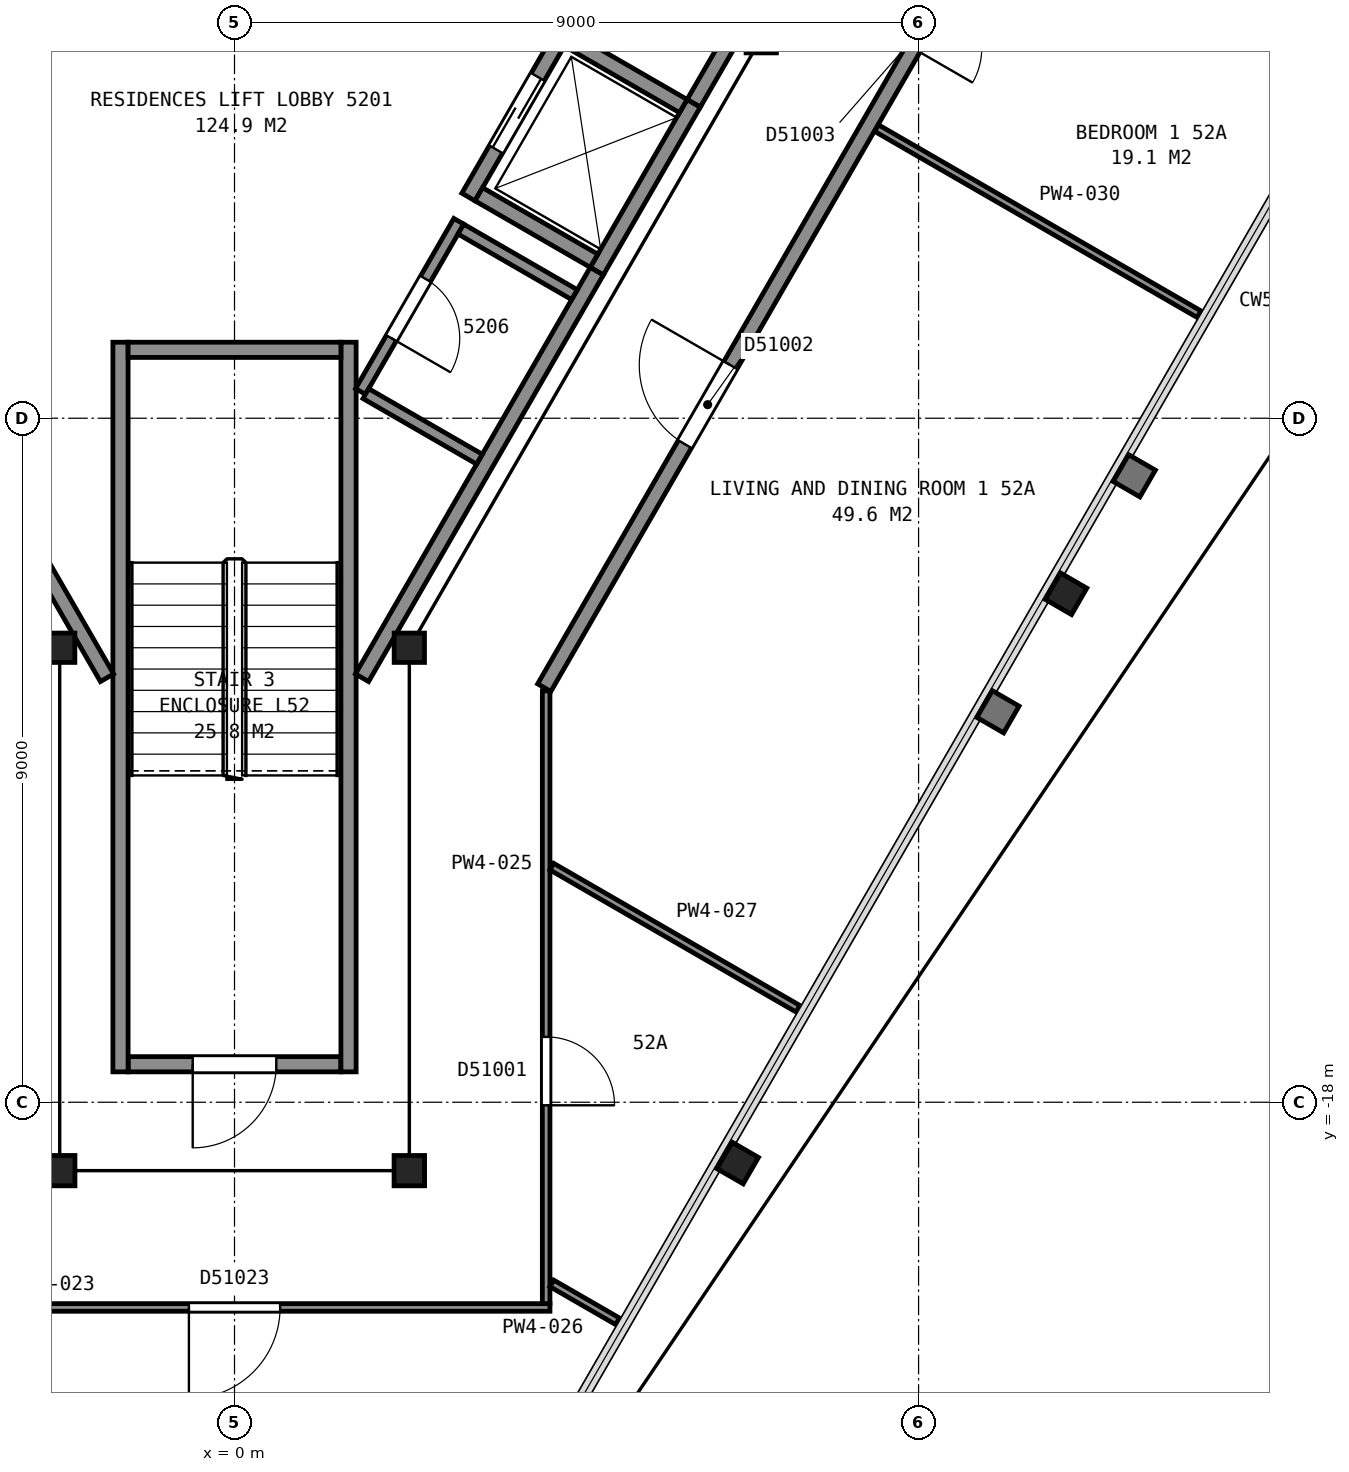
"""IFC4 building model, lengths in metres.
Left out: names, types, materials, properties, quantities, classifications, styles, units other than length and angle.
Written with IfcOpenShell. Run it as: python <this file> out.ifc"""

import sys

from ifc_helpers import new_model, si_unit, direction, frame, frame_2d, origin, origin_2d, place, context, subcontext, project, spatial, rectangle, i_section, extrude, element, fill, save


model = new_model("IFC4")
c1 = context("Model", 3, precision=1e-05, world=origin(), true_north=direction((0.0, 1.0)))
c2 = subcontext(c1, "Body", "Model", "MODEL_VIEW")
j1 = project(units=[si_unit("LENGTHUNIT", "METRE"), si_unit("PLANEANGLEUNIT", "RADIAN")], contexts=[c1])
p1 = place(None, origin())
s1 = spatial("IfcSite", under=j1, at=p1, CompositionType="ELEMENT")
p2 = place(p1, origin())
s2 = spatial("IfcBuilding", under=s1, at=p2, CompositionType="ELEMENT")
p3 = place(p2, frame((0.0, 0.0, 210.1)))
s3 = spatial("IfcBuildingStorey", under=s2, at=p3, CompositionType="ELEMENT", Elevation=210.1)
for number, where, z_axis, x_axis in (
    (1, (6.62, -18.8, 0.0), (0.0, 0.0, 1.0), (-0.5, -0.866, 0.0)),
    (2, (10.94, -11.31, 0.0), (0.0, 0.0, 1.0), (-0.5, -0.866, 0.0)),
):
    element("IfcColumn", number, at=place(p3, frame(where, z_axis=z_axis, x_axis=x_axis)), inside=s3, PredefinedType="COLUMN", context=c2, shape_type="SweptSolid", body=[
        extrude(i_section(OverallWidth=0.401, OverallDepth=0.399, WebThickness=0.025, FlangeThickness=0.04, FilletRadius=0.015, at=origin_2d()), origin(), (0.0, 0.0, 1.0), 3.665),
    ])
p4 = place(p3, frame((-2.3, -12.02, 0.0), z_axis=(0.0, 0.0, 1.0), x_axis=(1.0, 0.0, 0.0)))
e3 = element("IfcColumn", 3, at=p4, inside=s3, PredefinedType="COLUMN", context=c2, shape_type="SweptSolid", body=[
    extrude(i_section(OverallWidth=0.399, OverallDepth=0.386, WebThickness=0.021, FlangeThickness=0.033, FilletRadius=0.015, at=origin_2d()), origin(), (0.0, 0.0, 1.0), 3.7),
])
for number, where, z_axis, x_axis in (
    (4, (-2.3, -18.9, 0.0), (0.0, 0.0, 1.0), (-1.0, 0.0, 0.0)),
    (5, (2.3, -18.9, 0.0), (0.0, 0.0, 1.0), (-1.0, 0.0, 0.0)),
):
    element("IfcColumn", number, at=place(p3, frame(where, z_axis=z_axis, x_axis=x_axis)), inside=s3, PredefinedType="COLUMN", context=c2, shape_type="SweptSolid", body=[
        extrude(i_section(OverallWidth=0.401, OverallDepth=0.399, WebThickness=0.025, FlangeThickness=0.04, FilletRadius=0.015, at=origin_2d()), origin(), (0.0, 0.0, 1.0), 3.7),
    ])
for number, where, z_axis, x_axis in (
    (6, (2.3, -12.02, 0.0), (0.0, 0.0, 1.0), (1.0, 0.0, 0.0)),
    (7, (6.93, -4.0, 0.0), (0.0, 0.0, 1.0), (1.0, 0.0, 0.0)),
):
    element("IfcColumn", number, at=place(p3, frame(where, z_axis=z_axis, x_axis=x_axis)), inside=s3, PredefinedType="COLUMN", context=c2, shape_type="SweptSolid", body=[
        extrude(i_section(OverallWidth=0.399, OverallDepth=0.386, WebThickness=0.021, FlangeThickness=0.033, FilletRadius=0.015, at=origin_2d()), origin(), (0.0, 0.0, 1.0), 3.7),
    ])
p5 = place(p3, frame((-1.4, -17.5, 0.0), z_axis=(0.0, 0.0, 1.0), x_axis=(1.0, 0.0, 0.0)))
e8 = element("IfcWall", 8, at=p5, inside=s3, PredefinedType="PARTITIONING", context=c2, shape_type="SweptSolid", body=[
    extrude(rectangle(XDim=2.8, YDim=0.2, at=frame_2d((1.4, 0.0))), origin(), (0.0, 0.0, 1.0), 3.45),
])
p6 = place(p5, frame((0.85, 0.0, 0.0)))
e9 = element("IfcOpeningElement", 9, at=p6, cuts=e8, PredefinedType="OPENING", context=c2, shape_type="SweptSolid", body=[
    extrude(rectangle(XDim=1.1, YDim=2.1, at=frame_2d((0.55, 1.05))), frame((0.0, 0.11, 0.0), z_axis=(0.0, -1.0, 0.0), x_axis=(1.0, 0.0, 0.0)), (0.0, 0.0, 1.0), 0.22),
])
for number, where, z_axis, x_axis in (
    (10, (1.5, -8.0, 0.0), (0.0, 0.0, 1.0), (0.0, -1.0, 0.0)),
    (11, (-1.5, -8.0, 0.0), (0.0, 0.0, 1.0), (0.0, -1.0, 0.0)),
):
    element("IfcWall", number, at=place(p3, frame(where, z_axis=z_axis, x_axis=x_axis)), inside=s3, PredefinedType="PARTITIONING", context=c2, shape_type="SweptSolid", body=[
        extrude(rectangle(XDim=9.6, YDim=0.2, at=frame_2d((4.8, 0.0))), origin(), (0.0, 0.0, 1.0), 3.45),
    ])
p7 = place(p3, frame((-1.4, -8.1, 0.0), z_axis=(0.0, 0.0, 1.0), x_axis=(1.0, 0.0, 0.0)))
e12 = element("IfcWall", 12, at=p7, inside=s3, PredefinedType="PARTITIONING", context=c2, shape_type="SweptSolid", body=[
    extrude(rectangle(XDim=2.8, YDim=0.2, at=frame_2d((1.4, 0.0))), origin(), (0.0, 0.0, 1.0), 3.45),
])
p8 = place(p3, frame((4.766, -7.065, 0.0), z_axis=(0.0, 0.0, 1.0), x_axis=(0.499948979701, 0.866054858364, 0.0)))
e13 = element("IfcWall", 13, at=p8, inside=s3, PredefinedType="PARTITIONING", context=c2, shape_type="SweptSolid", body=[
    extrude(rectangle(XDim=2.55, YDim=0.2, at=frame_2d((1.275, 0.0))), origin(), (0.0, 0.0, 1.0), 3.7),
])
p9 = place(p3, frame((3.077, -6.09, 0.0), z_axis=(0.0, 0.0, 1.0), x_axis=(0.500062241894, 0.865989465428, 0.0)))
e14 = element("IfcWall", 14, at=p9, inside=s3, PredefinedType="PARTITIONING", context=c2, shape_type="SweptSolid", body=[
    extrude(rectangle(XDim=2.55, YDim=0.2, at=frame_2d((1.275, 0.0))), origin(), (0.0, 0.0, 1.0), 3.7),
])
p10 = place(p9, frame((0.725, 0.0, 0.0)))
e15 = element("IfcOpeningElement", 15, at=p10, cuts=e14, PredefinedType="OPENING", context=c2, shape_type="SweptSolid", body=[
    extrude(rectangle(XDim=1.1, YDim=2.1, at=frame_2d((0.55, 1.05))), frame((0.0, 0.11, 0.0), z_axis=(0.0, -1.0, 0.0), x_axis=(1.0, 0.0, 0.0)), (0.0, 0.0, 1.0), 0.22),
])
p11 = place(p3, frame((5.905, -4.893, 0.0), z_axis=(0.0, 0.0, 1.0), x_axis=(-0.866002029911, 0.500040482552, 0.0)))
e16 = element("IfcWall", 16, at=p11, inside=s3, PredefinedType="PARTITIONING", context=c2, shape_type="SweptSolid", body=[
    extrude(rectangle(XDim=1.75, YDim=0.2, at=frame_2d((0.875, 0.0))), origin(), (0.0, 0.0, 1.0), 3.7),
])
p12 = place(p3, frame((4.73, -6.928, 0.0), z_axis=(0.0, 0.0, 1.0), x_axis=(-0.866036909293, 0.499980071345, 0.0)))
e17 = element("IfcWall", 17, at=p12, inside=s3, PredefinedType="PARTITIONING", context=c2, shape_type="SweptSolid", body=[
    extrude(rectangle(XDim=1.75, YDim=0.2, at=frame_2d((0.875, 0.0))), origin(), (0.0, 0.0, 1.0), 3.7),
])
p13 = place(p3, frame((-4.655, -7.257, 0.0), z_axis=(0.0, 0.0, 1.0), x_axis=(0.499966124405, -0.866044960985, 0.0)))
e18 = element("IfcWall", 18, at=p13, inside=s3, PredefinedType="PARTITIONING", context=c2, shape_type="SweptSolid", body=[
    extrude(rectangle(XDim=5.956, YDim=0.2, at=frame_2d((2.978, 0.0))), origin(), (0.0, 0.0, 1.0), 3.45),
])
p14 = place(p13, frame((0.45, 0.0, 0.0)))
e19 = element("IfcOpeningElement", 19, at=p14, cuts=e18, PredefinedType="OPENING", context=c2, shape_type="SweptSolid", body=[
    extrude(rectangle(XDim=1.8, YDim=2.1, at=frame_2d((0.9, 1.05))), frame((0.0, 0.11, 0.0), z_axis=(0.0, -1.0, 0.0), x_axis=(1.0, 0.0, 0.0)), (0.0, 0.0, 1.0), 0.22),
])
p15 = place(p3, frame((1.677, -12.415, 0.0), z_axis=(0.0, 0.0, 1.0), x_axis=(0.500054337157, 0.865994029939, 0.0)))
e20 = element("IfcWall", 20, at=p15, inside=s3, PredefinedType="PARTITIONING", context=c2, shape_type="SweptSolid", body=[
    extrude(rectangle(XDim=6.177, YDim=0.2, at=frame_2d((3.088, 0.0))), origin(), (0.0, 0.0, 1.0), 3.45),
])
p16 = place(p3, frame((2.95, -6.409, 0.0), z_axis=(0.0, 0.0, 1.0), x_axis=(-0.499978610854, -0.866037752461, 0.0)))
e21 = element("IfcWall", 21, at=p16, inside=s3, PredefinedType="PARTITIONING", context=c2, shape_type="SweptSolid", body=[
    extrude(rectangle(XDim=2.585, YDim=0.15, at=frame_2d((1.292, 0.0))), origin(), (0.0, 0.0, 1.0), 3.45),
])
p17 = place(p16, frame((0.875, 0.0, 0.0)))
e22 = element("IfcOpeningElement", 22, at=p17, cuts=e21, PredefinedType="OPENING", context=c2, shape_type="SweptSolid", body=[
    extrude(rectangle(XDim=0.9, YDim=2.1, at=frame_2d((0.45, 1.05))), frame((0.0, 0.085, 0.0), z_axis=(0.0, -1.0, 0.0), x_axis=(1.0, 0.0, 0.0)), (0.0, 0.0, 1.0), 0.17),
])
for number, where, z_axis, x_axis in (
    (23, (1.728, -8.677, 0.0), (0.0, 0.0, 1.0), (0.866, -0.5, 0.0)),
    (24, (2.978, -6.511, 0.0), (0.0, 0.0, 1.0), (0.866, -0.5, 0.0)),
):
    element("IfcWall", number, at=place(p3, frame(where, z_axis=z_axis, x_axis=x_axis)), inside=s3, PredefinedType="PARTITIONING", context=c2, shape_type="SweptSolid", body=[
        extrude(rectangle(XDim=1.725, YDim=0.15, at=frame_2d((0.863, 0.0))), origin(), (0.0, 0.0, 1.0), 3.45),
    ])
p18 = place(p3, frame((6.042, -4.855, 0.0), z_axis=(0.0, 0.0, 1.0), x_axis=(0.500252727967, 0.865879442048, 0.0)))
e25 = element("IfcWall", 25, at=p18, inside=s3, PredefinedType="PARTITIONING", context=c2, shape_type="SweptSolid", body=[
    extrude(rectangle(XDim=2.617, YDim=0.2, at=frame_2d((1.309, 0.0))), origin(), (0.0, 0.0, 1.0), 3.45),
])
p19 = place(p3, frame((4.15, -20.7, 0.0), z_axis=(0.0, 0.0, 1.0), x_axis=(-1.0, 0.0, 0.0)))
e26 = element("IfcWall", 26, at=p19, inside=s3, PredefinedType="PARTITIONING", context=c2, shape_type="SweptSolid", body=[
    extrude(rectangle(XDim=8.3, YDim=0.1, at=frame_2d((4.15, 0.0))), origin(), (0.0, 0.0, 1.0), 2.713),
])
p20 = place(p19, frame((3.55, 0.0, 0.0)))
e27 = element("IfcOpeningElement", 27, at=p20, cuts=e26, PredefinedType="OPENING", context=c2, shape_type="SweptSolid", body=[
    extrude(rectangle(XDim=1.2, YDim=2.1, at=frame_2d((0.6, 1.05))), frame((0.0, 0.06, 0.0), z_axis=(0.0, -1.0, 0.0), x_axis=(1.0, 0.0, 0.0)), (0.0, 0.0, 1.0), 0.12),
])
p21 = place(p3, frame((4.1, -12.587, 0.0), z_axis=(0.0, 0.0, 1.0), x_axis=(0.0, -1.0, 0.0)))
e28 = element("IfcWall", 28, at=p21, inside=s3, PredefinedType="PARTITIONING", context=c2, shape_type="SweptSolid", body=[
    extrude(rectangle(XDim=8.063, YDim=0.1, at=frame_2d((4.031, 0.0))), origin(), (0.0, 0.0, 1.0), 2.713),
])
p22 = place(p21, frame((4.553, 0.0, 0.0)))
e29 = element("IfcOpeningElement", 29, at=p22, cuts=e28, PredefinedType="OPENING", context=c2, shape_type="SweptSolid", body=[
    extrude(rectangle(XDim=0.9, YDim=2.1, at=frame_2d((0.45, 1.05))), frame((0.0, 0.06, 0.0), z_axis=(0.0, -1.0, 0.0), x_axis=(1.0, 0.0, 0.0)), (0.0, 0.0, 1.0), 0.12),
])
p23 = place(p3, frame((4.175, -20.383, 0.0), z_axis=(0.0, 0.0, 1.0), x_axis=(0.866234439787, -0.499637764112, 0.0)))
e30 = element("IfcWall", 30, at=p23, inside=s3, PredefinedType="PARTITIONING", context=c2, shape_type="SweptSolid", body=[
    extrude(rectangle(XDim=0.998, YDim=0.1, at=frame_2d((0.499, 0.0))), origin(), (0.0, 0.0, 1.0), 2.713),
])
p24 = place(p3, frame((4.175, -14.9, 0.0), z_axis=(0.0, 0.0, 1.0), x_axis=(0.866057308191, -0.499944735875, 0.0)))
e31 = element("IfcWall", 31, at=p24, inside=s3, PredefinedType="PARTITIONING", context=c2, shape_type="SweptSolid", body=[
    extrude(rectangle(XDim=3.74, YDim=0.1, at=frame_2d((1.87, 0.0))), origin(), (0.0, 0.0, 1.0), 2.713),
])
p25 = place(p3, frame((12.903, 2.745, 0.0), z_axis=(0.0, 0.0, 1.0), x_axis=(-0.499999743747, -0.866025551732, 0.0)))
e32 = element("IfcWall", 32, at=p25, inside=s3, PredefinedType="PARTITIONING", context=c2, shape_type="SweptSolid", body=[
    extrude(rectangle(XDim=17.656, YDim=0.2, at=frame_2d((8.828, 0.0))), origin(), (0.0, 0.0, 1.0), 2.713),
])
p26 = place(p25, frame((12.756, 0.0, 0.0)))
e33 = element("IfcOpeningElement", 33, at=p26, cuts=e32, PredefinedType="OPENING", context=c2, shape_type="SweptSolid", body=[
    extrude(rectangle(XDim=1.2, YDim=2.1, at=frame_2d((0.6, 1.05))), frame((0.0, 0.11, 0.0), z_axis=(0.0, -1.0, 0.0), x_axis=(1.0, 0.0, 0.0)), (0.0, 0.0, 1.0), 0.22),
])
p27 = place(p25, frame((7.044, 0.0, 0.0)))
e34 = element("IfcOpeningElement", 34, at=p27, cuts=e32, PredefinedType="OPENING", context=c2, shape_type="SweptSolid", body=[
    extrude(rectangle(XDim=0.9, YDim=2.1, at=frame_2d((0.45, 1.05))), frame((0.0, 0.11, 0.0), z_axis=(0.0, -1.0, 0.0), x_axis=(1.0, 0.0, 0.0)), (0.0, 0.0, 1.0), 0.22),
])
p28 = place(p25, frame((0.417, 0.0, 0.0)))
e35 = element("IfcOpeningElement", 35, at=p28, cuts=e32, PredefinedType="OPENING", context=c2, shape_type="SweptSolid", body=[
    extrude(rectangle(XDim=0.9, YDim=2.1, at=frame_2d((0.45, 1.05))), frame((0.0, 0.11, 0.0), z_axis=(0.0, -1.0, 0.0), x_axis=(1.0, 0.0, 0.0)), (0.0, 0.0, 1.0), 0.22),
])
p29 = place(p3, frame((8.447, -5.182, 0.0), z_axis=(0.0, 0.0, 1.0), x_axis=(0.866106755222, -0.499859068697, 0.0)))
e36 = element("IfcWall", 36, at=p29, inside=s3, PredefinedType="PARTITIONING", context=c2, shape_type="SweptSolid", body=[
    extrude(rectangle(XDim=4.899, YDim=0.1, at=frame_2d((2.449, 0.0))), origin(), (0.0, 0.0, 1.0), 2.713),
])
p30 = place(p6, origin())
e37 = element("IfcDoor", 37, at=p30, inside=s3, OperationType="SINGLE_SWING_LEFT", PredefinedType="DOOR", context=c2, shape_type="SweptSolid", body=[
    extrude(rectangle(XDim=1.1, YDim=2.1, at=frame_2d((0.55, 1.05))), frame((0.0, 0.025, 0.0), z_axis=(0.0, -1.0, 0.0), x_axis=(1.0, 0.0, 0.0)), (0.0, 0.0, 1.0), 0.05),
])
fill(e9, e37)
p31 = place(p10, origin())
e38 = element("IfcDoor", 38, at=p31, inside=s3, OperationType="SLIDING_TO_LEFT", PredefinedType="DOOR", context=c2, shape_type="SweptSolid", body=[
    extrude(rectangle(XDim=1.1, YDim=2.1, at=frame_2d((0.55, 1.05))), frame((0.0, 0.025, 0.0), z_axis=(0.0, -1.0, 0.0), x_axis=(1.0, 0.0, 0.0)), (0.0, 0.0, 1.0), 0.05),
])
fill(e15, e38)
p32 = place(p17, origin())
e39 = element("IfcDoor", 39, at=p32, inside=s3, OperationType="SINGLE_SWING_RIGHT", PredefinedType="DOOR", context=c2, shape_type="SweptSolid", body=[
    extrude(rectangle(XDim=0.9, YDim=2.1, at=frame_2d((0.45, 1.05))), frame((0.0, 0.025, 0.0), z_axis=(0.0, -1.0, 0.0), x_axis=(1.0, 0.0, 0.0)), (0.0, 0.0, 1.0), 0.05),
])
fill(e22, e39)
p33 = place(p20, origin())
e40 = element("IfcDoor", 40, at=p33, inside=s3, OperationType="SINGLE_SWING_RIGHT", PredefinedType="DOOR", context=c2, shape_type="SweptSolid", body=[
    extrude(rectangle(XDim=1.2, YDim=2.1, at=frame_2d((0.6, 1.05))), frame((0.0, 0.025, 0.0), z_axis=(0.0, -1.0, 0.0), x_axis=(1.0, 0.0, 0.0)), (0.0, 0.0, 1.0), 0.05),
])
fill(e27, e40)
p34 = place(p22, origin())
e41 = element("IfcDoor", 41, at=p34, inside=s3, OperationType="SINGLE_SWING_RIGHT", PredefinedType="DOOR", context=c2, shape_type="SweptSolid", body=[
    extrude(rectangle(XDim=0.9, YDim=2.1, at=frame_2d((0.45, 1.05))), frame((0.0, 0.025, 0.0), z_axis=(0.0, -1.0, 0.0), x_axis=(1.0, 0.0, 0.0)), (0.0, 0.0, 1.0), 0.05),
])
fill(e29, e41)
p35 = place(p26, origin())
e42 = element("IfcDoor", 42, at=p35, inside=s3, OperationType="SINGLE_SWING_LEFT", PredefinedType="DOOR", context=c2, shape_type="SweptSolid", body=[
    extrude(rectangle(XDim=1.2, YDim=2.1, at=frame_2d((0.6, 1.05))), frame((0.0, 0.025, 0.0), z_axis=(0.0, -1.0, 0.0), x_axis=(1.0, 0.0, 0.0)), (0.0, 0.0, 1.0), 0.05),
])
fill(e33, e42)
save(model, sys.argv[1])
